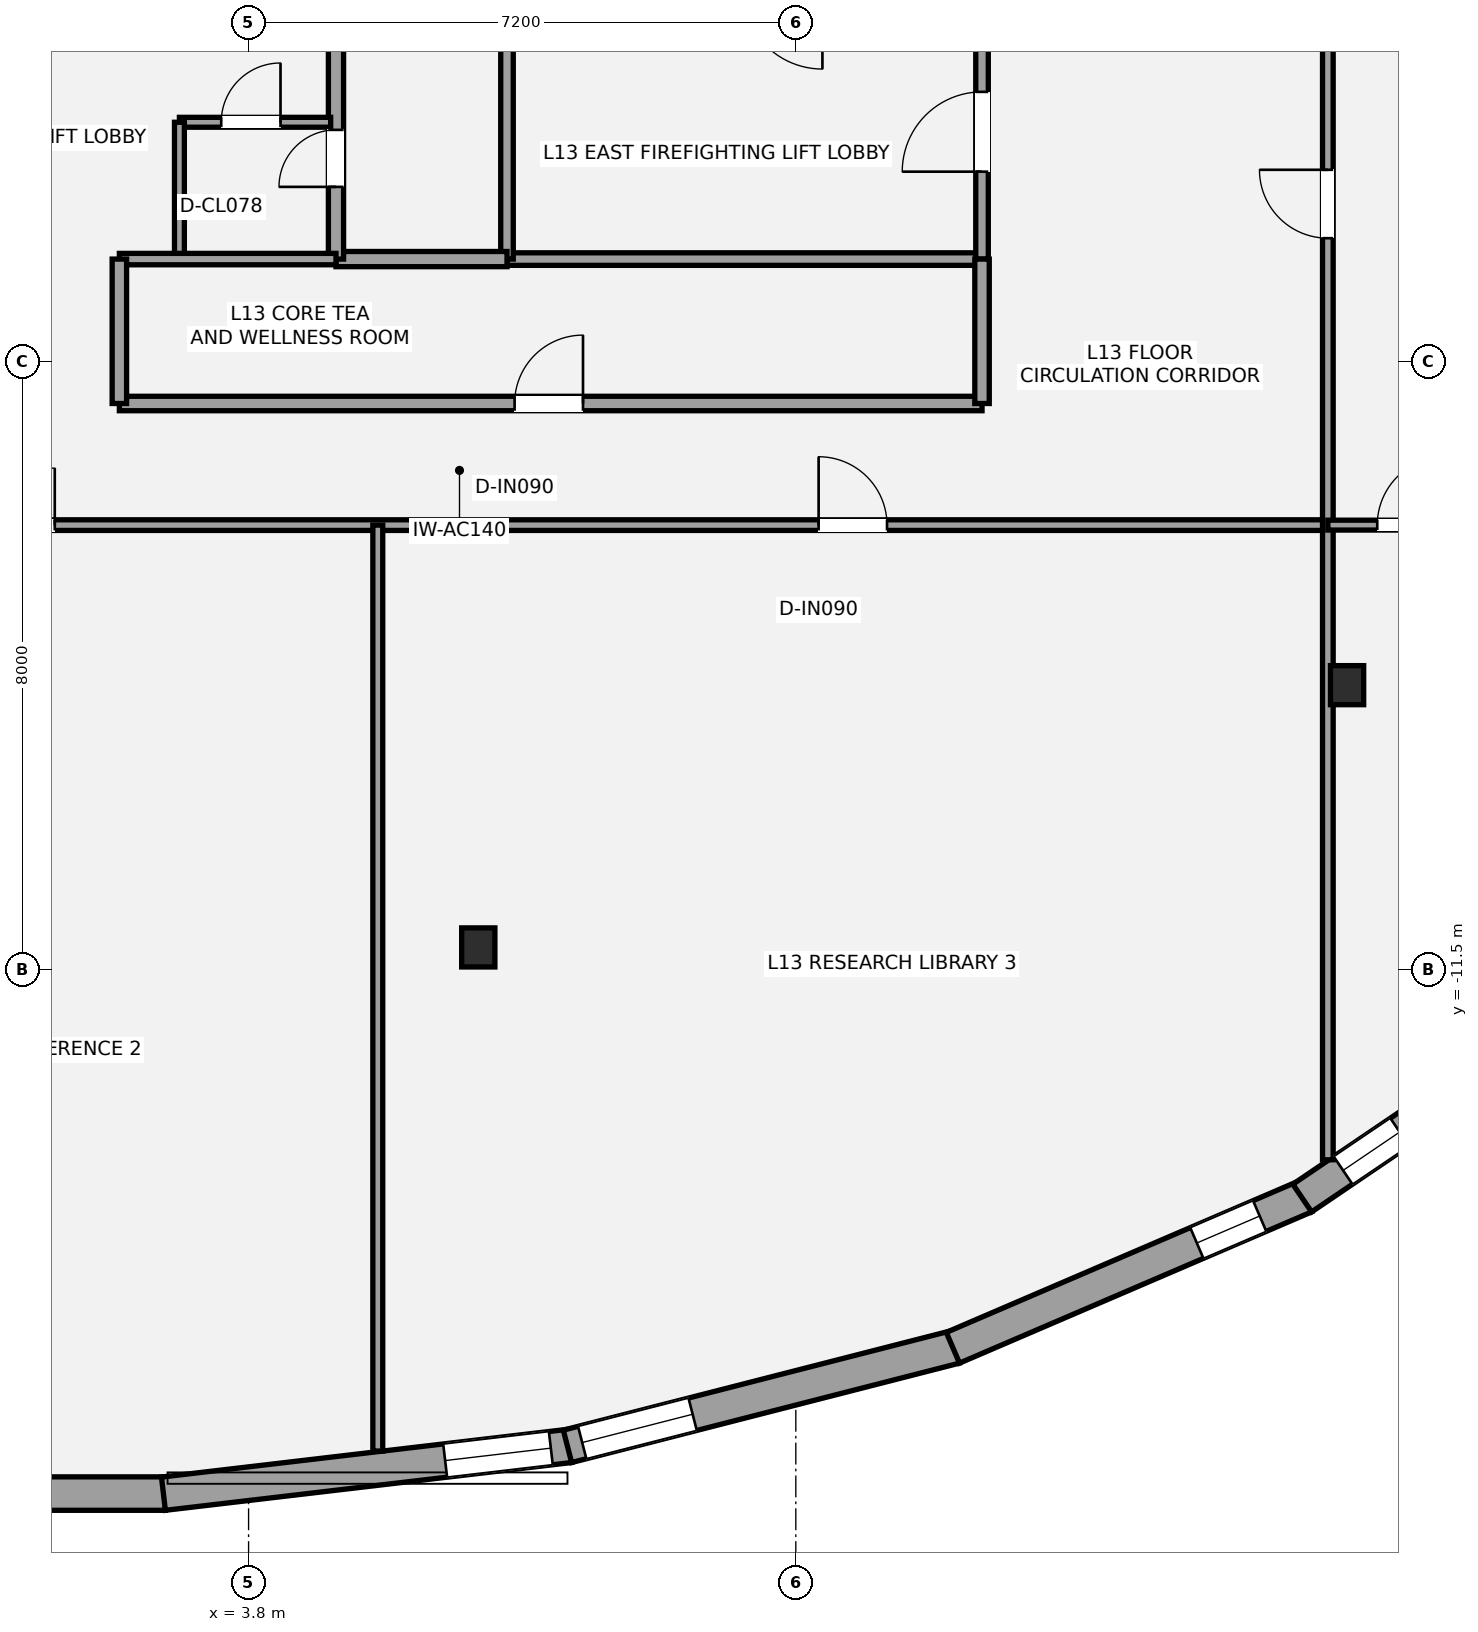
"""IFC4 building model, lengths in metres.
Left out: names, types, materials, properties, quantities, classifications, styles, units other than length and angle.
Written with IfcOpenShell. Run it as: python <this file> out.ifc"""

import sys

from ifc_helpers import new_model, si_unit, direction, frame, frame_2d, origin, origin_2d, place, context, subcontext, project, spatial, rectangle, i_section, extrude, element, fill, save


model = new_model("IFC4")
c1 = context("Model", 3, precision=1e-05, world=origin(), true_north=direction((0.0, 1.0)))
c2 = subcontext(c1, "Body", "Model", "MODEL_VIEW")
j1 = project(units=[si_unit("LENGTHUNIT", "METRE"), si_unit("PLANEANGLEUNIT", "RADIAN")], contexts=[c1])
p1 = place(None, origin())
s1 = spatial("IfcSite", under=j1, at=p1, CompositionType="ELEMENT")
p2 = place(p1, origin())
s2 = spatial("IfcBuilding", under=s1, at=p2, CompositionType="ELEMENT")
p3 = place(p2, frame((0.0, 0.0, 52.2)))
s3 = spatial("IfcBuildingStorey", under=s2, at=p3, CompositionType="ELEMENT", Elevation=52.2)
for number, where, z_axis, x_axis in (
    (1, (6.822, -11.206, 0.0), (0.0, 0.0, 1.0), (1.0, 0.0, 0.0)),
    (2, (18.253, -7.756, 0.0), (0.0, 0.0, 1.0), (1.0, 0.0, 0.0)),
):
    element("IfcColumn", number, at=place(p3, frame(where, z_axis=z_axis, x_axis=x_axis)), inside=s3, PredefinedType="COLUMN", context=c2, shape_type="SweptSolid", body=[
        extrude(i_section(OverallWidth=0.437, OverallDepth=0.514, WebThickness=0.061, FlangeThickness=0.097, at=origin_2d()), origin(), (0.0, 0.0, 1.0), 3.6),
    ])
p4 = place(p3, frame((2.705, -18.391, 0.0), z_axis=(0.0, 0.0, 1.0), x_axis=(-1.0, 0.0, 0.0)))
e3 = element("IfcWall", 3, at=p4, inside=s3, PredefinedType="STANDARD", context=c2, shape_type="SweptSolid", body=[
    extrude(rectangle(XDim=5.41, YDim=0.44, at=frame_2d((2.705, 0.0))), origin(), (0.0, 0.0, 1.0), 2.533),
])
p5 = place(p4, frame((3.761, 0.0, 0.58)))
e4 = element("IfcOpeningElement", 4, at=p5, cuts=e3, PredefinedType="OPENING", context=c2, shape_type="SweptSolid", body=[
    extrude(rectangle(XDim=1.4, YDim=1.55, at=frame_2d((0.7, 0.775))), frame((0.0, 0.23, 0.0), z_axis=(0.0, -1.0, 0.0), x_axis=(1.0, 0.0, 0.0)), (0.0, 0.0, 1.0), 0.46),
])
p6 = place(p3, frame((8.025, -17.764, 0.0), z_axis=(0.0, 0.0, 1.0), x_axis=(-0.993159890371, -0.116762289112, 0.0)))
e5 = element("IfcWall", 5, at=p6, inside=s3, PredefinedType="STANDARD", context=c2, shape_type="SweptSolid", body=[
    extrude(rectangle(XDim=5.382, YDim=0.44, at=frame_2d((2.691, 0.0))), origin(), (0.0, 0.0, 1.0), 2.533),
])
p7 = place(p6, frame((0.25, 0.0, 0.45)))
e6 = element("IfcOpeningElement", 6, at=p7, cuts=e5, PredefinedType="OPENING", context=c2, shape_type="SweptSolid", body=[
    extrude(rectangle(XDim=1.4, YDim=1.55, at=frame_2d((0.7, 0.775))), frame((0.0, 0.23, 0.0), z_axis=(0.0, -1.0, 0.0), x_axis=(1.0, 0.0, 0.0)), (0.0, 0.0, 1.0), 0.46),
])
p8 = place(p3, frame((13.099, -16.462, 0.0), z_axis=(0.0, 0.0, 1.0), x_axis=(-0.968705592422, -0.248212560542, 0.0)))
e7 = element("IfcWall", 7, at=p8, inside=s3, PredefinedType="STANDARD", context=c2, shape_type="SweptSolid", body=[
    extrude(rectangle(XDim=5.268, YDim=0.44, at=frame_2d((2.634, 0.0))), origin(), (0.0, 0.0, 1.0), 2.533),
])
p9 = place(p8, frame((3.568, 0.0, 0.48)))
e8 = element("IfcOpeningElement", 8, at=p9, cuts=e7, PredefinedType="OPENING", context=c2, shape_type="SweptSolid", body=[
    extrude(rectangle(XDim=1.5, YDim=1.7, at=frame_2d((0.75, 0.85))), frame((0.0, 0.23, 0.0), z_axis=(0.0, -1.0, 0.0), x_axis=(1.0, 0.0, 0.0)), (0.0, 0.0, 1.0), 0.46),
])
p10 = place(p3, frame((17.7, -14.483, 0.0), z_axis=(0.0, 0.0, 1.0), x_axis=(-0.918881850071, -0.394532819433, 0.0)))
e9 = element("IfcWall", 9, at=p10, inside=s3, PredefinedType="STANDARD", context=c2, shape_type="SweptSolid", body=[
    extrude(rectangle(XDim=5.042, YDim=0.44, at=frame_2d((2.521, 0.0))), origin(), (0.0, 0.0, 1.0), 2.533),
])
p11 = place(p10, frame((0.649, 0.0, 0.58)))
e10 = element("IfcOpeningElement", 10, at=p11, cuts=e9, PredefinedType="OPENING", context=c2, shape_type="SweptSolid", body=[
    extrude(rectangle(XDim=0.9, YDim=1.35, at=frame_2d((0.45, 0.675))), frame((0.0, 0.23, 0.0), z_axis=(0.0, -1.0, 0.0), x_axis=(1.0, 0.0, 0.0)), (0.0, 0.0, 1.0), 0.46),
])
p12 = place(p3, frame((21.549, -11.87, 0.0), z_axis=(0.0, 0.0, 1.0), x_axis=(-0.827825981515, -0.560984976919, 0.0)))
e11 = element("IfcWall", 11, at=p12, inside=s3, PredefinedType="STANDARD", context=c2, shape_type="SweptSolid", body=[
    extrude(rectangle(XDim=4.695, YDim=0.44, at=frame_2d((2.347, 0.0))), origin(), (0.0, 0.0, 1.0), 2.533),
])
p13 = place(p12, frame((3.145, 0.0, 0.58)))
e12 = element("IfcOpeningElement", 12, at=p13, cuts=e11, PredefinedType="OPENING", context=c2, shape_type="SweptSolid", body=[
    extrude(rectangle(XDim=0.9, YDim=1.35, at=frame_2d((0.45, 0.675))), frame((0.0, 0.23, 0.0), z_axis=(0.0, -1.0, 0.0), x_axis=(1.0, 0.0, 0.0)), (0.0, 0.0, 1.0), 0.46),
])
p14 = place(p3, frame((7.2, -2.15, 0.0), z_axis=(0.0, 0.0, 1.0), x_axis=(1.0, 0.0, 0.0)))
e13 = element("IfcWall", 13, at=p14, inside=s3, PredefinedType="PARTITIONING", context=c2, shape_type="SweptSolid", body=[
    extrude(rectangle(XDim=6.25, YDim=0.165, at=frame_2d((3.125, 0.0))), origin(), (0.0, 0.0, 1.0), 3.4),
])
p15 = place(p3, frame((7.2, -2.15, 0.0), z_axis=(0.0, 0.0, 1.0), x_axis=(0.0, 1.0, 0.0)))
e14 = element("IfcWall", 14, at=p15, inside=s3, PredefinedType="PARTITIONING", context=c2, shape_type="SweptSolid", body=[
    extrude(rectangle(XDim=3.15, YDim=0.165, at=frame_2d((1.575, 0.0))), origin(), (0.0, 0.0, 1.0), 2.853),
])
p16 = place(p3, frame((13.45, -2.15, 0.0), z_axis=(0.0, 0.0, 1.0), x_axis=(0.0, 1.0, 0.0)))
e15 = element("IfcWall", 15, at=p16, inside=s3, PredefinedType="PARTITIONING", context=c2, shape_type="SweptSolid", body=[
    extrude(rectangle(XDim=3.15, YDim=0.165, at=frame_2d((1.575, 0.0))), origin(), (0.0, 0.0, 1.0), 2.853),
])
p17 = place(p16, frame((1.15, 0.0, 0.0)))
e16 = element("IfcOpeningElement", 16, at=p17, cuts=e15, PredefinedType="OPENING", context=c2, shape_type="SweptSolid", body=[
    extrude(rectangle(XDim=1.05, YDim=2.15, at=frame_2d((0.525, 1.075))), frame((0.0, 0.093, 0.0), z_axis=(0.0, -1.0, 0.0), x_axis=(1.0, 0.0, 0.0)), (0.0, 0.0, 1.0), 0.185),
])
p18 = place(p3, frame((4.95, -2.15, 0.0), z_axis=(0.0, 0.0, 1.0), x_axis=(1.0, 0.0, 0.0)))
e17 = element("IfcWall", 17, at=p18, inside=s3, PredefinedType="SOLIDWALL", context=c2, shape_type="SweptSolid", body=[
    extrude(rectangle(XDim=2.25, YDim=0.2, at=frame_2d((1.125, 0.0))), origin(), (0.0, 0.0, 1.0), 3.4),
])
p19 = place(p3, frame((4.95, -2.15, 0.0), z_axis=(0.0, 0.0, 1.0), x_axis=(0.0, 1.0, 0.0)))
e18 = element("IfcWall", 18, at=p19, inside=s3, PredefinedType="SOLIDWALL", context=c2, shape_type="SweptSolid", body=[
    extrude(rectangle(XDim=3.15, YDim=0.2, at=frame_2d((1.575, 0.0))), origin(), (0.0, 0.0, 1.0), 2.853),
])
p20 = place(p19, frame((0.95, 0.0, 0.0)))
e19 = element("IfcOpeningElement", 19, at=p20, cuts=e18, PredefinedType="OPENING", context=c2, shape_type="SweptSolid", body=[
    extrude(rectangle(XDim=0.75, YDim=2.1, at=frame_2d((0.375, 1.05))), frame((0.0, 0.11, 0.0), z_axis=(0.0, -1.0, 0.0), x_axis=(1.0, 0.0, 0.0)), (0.0, 0.0, 1.0), 0.22),
])
p21 = place(p3, frame((2.89, -0.35, 0.0), z_axis=(0.0, 0.0, 1.0), x_axis=(1.0, 0.0, 0.0)))
e20 = element("IfcWall", 20, at=p21, inside=s3, PredefinedType="PARTITIONING", context=c2, shape_type="SweptSolid", body=[
    extrude(rectangle(XDim=1.99, YDim=0.13, at=frame_2d((0.995, 0.0))), origin(), (0.0, 0.0, 1.0), 3.4),
])
p22 = place(p21, frame((0.55, 0.0, 0.0)))
e21 = element("IfcOpeningElement", 21, at=p22, cuts=e20, PredefinedType="OPENING", context=c2, shape_type="SweptSolid", body=[
    extrude(rectangle(XDim=0.78, YDim=2.1, at=frame_2d((0.39, 1.05))), frame((0.0, 0.075, 0.0), z_axis=(0.0, -1.0, 0.0), x_axis=(1.0, 0.0, 0.0)), (0.0, 0.0, 1.0), 0.15),
])
p23 = place(p3, frame((2.89, -2.15, 0.0), z_axis=(0.0, 0.0, 1.0), x_axis=(0.0, 1.0, 0.0)))
e22 = element("IfcWall", 22, at=p23, inside=s3, PredefinedType="PARTITIONING", context=c2, shape_type="SweptSolid", body=[
    extrude(rectangle(XDim=1.8, YDim=0.13, at=frame_2d((0.9, 0.0))), origin(), (0.0, 0.0, 1.0), 3.4),
])
p24 = place(p3, frame((2.1, -4.05, 0.0), z_axis=(0.0, 0.0, 1.0), x_axis=(1.0, 0.0, 0.0)))
e23 = element("IfcWall", 23, at=p24, inside=s3, PredefinedType="PLUMBINGWALL", context=c2, shape_type="SweptSolid", body=[
    extrude(rectangle(XDim=11.35, YDim=0.19, at=frame_2d((5.675, 0.0))), origin(), (0.0, 0.0, 1.0), 2.933),
])
p25 = place(p24, frame((5.2, 0.0, 0.0)))
e24 = element("IfcOpeningElement", 24, at=p25, cuts=e23, PredefinedType="OPENING", context=c2, shape_type="SweptSolid", body=[
    extrude(rectangle(XDim=0.9, YDim=2.1, at=frame_2d((0.45, 1.05))), frame((0.0, 0.105, 0.0), z_axis=(0.0, -1.0, 0.0), x_axis=(1.0, 0.0, 0.0)), (0.0, 0.0, 1.0), 0.21),
])
p26 = place(p3, frame((2.1, -2.15, 0.0), z_axis=(0.0, 0.0, 1.0), x_axis=(1.0, 0.0, 0.0)))
e25 = element("IfcWall", 25, at=p26, inside=s3, PredefinedType="PLUMBINGWALL", context=c2, shape_type="SweptSolid", body=[
    extrude(rectangle(XDim=2.85, YDim=0.15, at=frame_2d((1.425, 0.0))), origin(), (0.0, 0.0, 1.0), 3.4),
])
p27 = place(p3, frame((2.1, -4.05, 0.0), z_axis=(0.0, 0.0, 1.0), x_axis=(0.0, 1.0, 0.0)))
e26 = element("IfcWall", 26, at=p27, inside=s3, PredefinedType="PLUMBINGWALL", context=c2, shape_type="SweptSolid", body=[
    extrude(rectangle(XDim=1.9, YDim=0.19, at=frame_2d((0.95, 0.0))), origin(), (0.0, 0.0, 1.0), 3.4),
])
p28 = place(p3, frame((13.45, -4.05, 0.0), z_axis=(0.0, 0.0, 1.0), x_axis=(0.0, 1.0, 0.0)))
e27 = element("IfcWall", 27, at=p28, inside=s3, PredefinedType="PLUMBINGWALL", context=c2, shape_type="SweptSolid", body=[
    extrude(rectangle(XDim=1.9, YDim=0.19, at=frame_2d((0.95, 0.0))), origin(), (0.0, 0.0, 1.0), 2.853),
])
p29 = place(p3, frame((-16.1, -5.65, 0.0), z_axis=(0.0, 0.0, 1.0), x_axis=(1.0, 0.0, 0.0)))
e28 = element("IfcWall", 28, at=p29, inside=s3, PredefinedType="PARTITIONING", context=c2, shape_type="SweptSolid", body=[
    extrude(rectangle(XDim=34.1, YDim=0.14, at=frame_2d((17.05, 0.0))), origin(), (0.0, 0.0, 1.0), 3.4),
])
p30 = place(p29, frame((5.35, 0.0, 0.0)))
e29 = element("IfcOpeningElement", 29, at=p30, cuts=e28, PredefinedType="OPENING", context=c2, shape_type="SweptSolid", body=[
    extrude(rectangle(XDim=0.9, YDim=2.1, at=frame_2d((0.45, 1.05))), frame((0.0, 0.08, 0.0), z_axis=(0.0, -1.0, 0.0), x_axis=(1.0, 0.0, 0.0)), (0.0, 0.0, 1.0), 0.16),
])
p31 = place(p29, frame((15.85, 0.0, 0.0)))
e30 = element("IfcOpeningElement", 30, at=p31, cuts=e28, PredefinedType="OPENING", context=c2, shape_type="SweptSolid", body=[
    extrude(rectangle(XDim=1.5, YDim=2.15, at=frame_2d((0.75, 1.075))), frame((0.0, 0.08, 0.0), z_axis=(0.0, -1.0, 0.0), x_axis=(1.0, 0.0, 0.0)), (0.0, 0.0, 1.0), 0.16),
])
p32 = place(p29, frame((27.4, 0.0, 0.0)))
e31 = element("IfcOpeningElement", 31, at=p32, cuts=e28, PredefinedType="OPENING", context=c2, shape_type="SweptSolid", body=[
    extrude(rectangle(XDim=0.9, YDim=2.1, at=frame_2d((0.45, 1.05))), frame((0.0, 0.08, 0.0), z_axis=(0.0, -1.0, 0.0), x_axis=(1.0, 0.0, 0.0)), (0.0, 0.0, 1.0), 0.16),
])
p33 = place(p3, frame((18.0, -14.0, 0.0), z_axis=(0.0, 0.0, 1.0), x_axis=(0.0, 1.0, 0.0)))
e32 = element("IfcWall", 32, at=p33, inside=s3, PredefinedType="PARTITIONING", context=c2, shape_type="SweptSolid", body=[
    extrude(rectangle(XDim=19.85, YDim=0.14, at=frame_2d((9.925, 0.0))), origin(), (0.0, 0.0, 1.0), 2.841),
])
p34 = place(p33, frame((12.125, 0.0, 0.0)))
e33 = element("IfcOpeningElement", 33, at=p34, cuts=e32, PredefinedType="OPENING", context=c2, shape_type="SweptSolid", body=[
    extrude(rectangle(XDim=0.9, YDim=2.1, at=frame_2d((0.45, 1.05))), frame((0.0, 0.08, 0.0), z_axis=(0.0, -1.0, 0.0), x_axis=(1.0, 0.0, 0.0)), (0.0, 0.0, 1.0), 0.16),
])
p35 = place(p33, frame((17.875, 0.0, 0.0)))
e34 = element("IfcOpeningElement", 34, at=p35, cuts=e32, PredefinedType="OPENING", context=c2, shape_type="SweptSolid", body=[
    extrude(rectangle(XDim=0.9, YDim=2.1, at=frame_2d((0.45, 1.05))), frame((0.0, 0.08, 0.0), z_axis=(0.0, -1.0, 0.0), x_axis=(1.0, 0.0, 0.0)), (0.0, 0.0, 1.0), 0.16),
])
p36 = place(p3, frame((5.5, -17.832, 0.0), z_axis=(0.0, 0.0, 1.0), x_axis=(0.0, 1.0, 0.0)))
e35 = element("IfcWall", 35, at=p36, inside=s3, PredefinedType="PARTITIONING", context=c2, shape_type="SweptSolid", body=[
    extrude(rectangle(XDim=12.182, YDim=0.13, at=frame_2d((6.091, 0.0))), origin(), (0.0, 0.0, 1.0), 2.853),
])
p37 = place(p3, frame((18.0, -5.65, 0.0), z_axis=(0.0, 0.0, 1.0), x_axis=(1.0, 0.0, 0.0)))
e36 = element("IfcWall", 36, at=p37, inside=s3, PredefinedType="PARTITIONING", context=c2, shape_type="SweptSolid", body=[
    extrude(rectangle(XDim=7.917, YDim=0.13, at=frame_2d((3.958, 0.0))), origin(), (0.0, 0.0, 1.0), 2.779),
])
p38 = place(p37, frame((0.65, 0.0, 0.0)))
e37 = element("IfcOpeningElement", 37, at=p38, cuts=e36, PredefinedType="OPENING", context=c2, shape_type="SweptSolid", body=[
    extrude(rectangle(XDim=0.9, YDim=2.1, at=frame_2d((0.45, 1.05))), frame((0.0, 0.075, 0.0), z_axis=(0.0, -1.0, 0.0), x_axis=(1.0, 0.0, 0.0)), (0.0, 0.0, 1.0), 0.15),
])
p39 = place(p7, origin())
e38 = element("IfcWindow", 38, at=p39, inside=s3, PartitioningType="SINGLE_PANEL", PredefinedType="WINDOW", context=c2, shape_type="SweptSolid", body=[
    extrude(rectangle(XDim=1.4, YDim=1.55, at=frame_2d((0.7, 0.775))), frame((0.0, -0.01, 0.0), z_axis=(0.0, -1.0, 0.0), x_axis=(1.0, 0.0, 0.0)), (0.0, 0.0, 1.0), 0.06),
])
fill(e6, e38)
p40 = place(p9, origin())
e39 = element("IfcWindow", 39, at=p40, inside=s3, PartitioningType="SINGLE_PANEL", PredefinedType="WINDOW", context=c2, shape_type="SweptSolid", body=[
    extrude(rectangle(XDim=1.5, YDim=1.7, at=frame_2d((0.75, 0.85))), frame((0.0, -0.01, 0.0), z_axis=(0.0, -1.0, 0.0), x_axis=(1.0, 0.0, 0.0)), (0.0, 0.0, 1.0), 0.06),
])
fill(e8, e39)
p41 = place(p11, origin())
e40 = element("IfcWindow", 40, at=p41, inside=s3, PartitioningType="SINGLE_PANEL", PredefinedType="WINDOW", context=c2, shape_type="SweptSolid", body=[
    extrude(rectangle(XDim=0.9, YDim=1.35, at=frame_2d((0.45, 0.675))), frame((0.0, -0.01, 0.0), z_axis=(0.0, -1.0, 0.0), x_axis=(1.0, 0.0, 0.0)), (0.0, 0.0, 1.0), 0.06),
])
fill(e10, e40)
p42 = place(p13, origin())
e41 = element("IfcWindow", 41, at=p42, inside=s3, PartitioningType="SINGLE_PANEL", PredefinedType="WINDOW", context=c2, shape_type="SweptSolid", body=[
    extrude(rectangle(XDim=0.9, YDim=1.35, at=frame_2d((0.45, 0.675))), frame((0.0, -0.01, 0.0), z_axis=(0.0, -1.0, 0.0), x_axis=(1.0, 0.0, 0.0)), (0.0, 0.0, 1.0), 0.06),
])
fill(e12, e41)
p43 = place(p17, origin())
e42 = element("IfcDoor", 42, at=p43, inside=s3, OperationType="SINGLE_SWING_LEFT", PredefinedType="DOOR", context=c2, shape_type="SweptSolid", body=[
    extrude(rectangle(XDim=1.05, YDim=2.15, at=frame_2d((0.525, 1.075))), frame((0.0, 0.025, 0.0), z_axis=(0.0, -1.0, 0.0), x_axis=(1.0, 0.0, 0.0)), (0.0, 0.0, 1.0), 0.05),
])
fill(e16, e42)
p44 = place(p20, origin())
e43 = element("IfcDoor", 43, at=p44, inside=s3, OperationType="SINGLE_SWING_LEFT", PredefinedType="DOOR", context=c2, shape_type="SweptSolid", body=[
    extrude(rectangle(XDim=0.75, YDim=2.1, at=frame_2d((0.375, 1.05))), frame((0.0, 0.025, 0.0), z_axis=(0.0, -1.0, 0.0), x_axis=(1.0, 0.0, 0.0)), (0.0, 0.0, 1.0), 0.05),
])
fill(e19, e43)
p45 = place(p22, origin())
e44 = element("IfcDoor", 44, at=p45, inside=s3, OperationType="SINGLE_SWING_RIGHT", PredefinedType="DOOR", context=c2, shape_type="SweptSolid", body=[
    extrude(rectangle(XDim=0.78, YDim=2.1, at=frame_2d((0.39, 1.05))), frame((0.0, 0.025, 0.0), z_axis=(0.0, -1.0, 0.0), x_axis=(1.0, 0.0, 0.0)), (0.0, 0.0, 1.0), 0.05),
])
fill(e21, e44)
p46 = place(p25, origin())
e45 = element("IfcDoor", 45, at=p46, inside=s3, OperationType="SINGLE_SWING_RIGHT", PredefinedType="DOOR", context=c2, shape_type="SweptSolid", body=[
    extrude(rectangle(XDim=0.9, YDim=2.1, at=frame_2d((0.45, 1.05))), frame((0.0, 0.025, 0.0), z_axis=(0.0, -1.0, 0.0), x_axis=(1.0, 0.0, 0.0)), (0.0, 0.0, 1.0), 0.05),
])
fill(e24, e45)
p47 = place(p31, origin())
e46 = element("IfcDoor", 46, at=p47, inside=s3, OperationType="DOUBLE_DOOR_SINGLE_SWING", PredefinedType="DOOR", context=c2, shape_type="SweptSolid", body=[
    extrude(rectangle(XDim=1.5, YDim=2.15, at=frame_2d((0.75, 1.075))), frame((0.0, 0.025, 0.0), z_axis=(0.0, -1.0, 0.0), x_axis=(1.0, 0.0, 0.0)), (0.0, 0.0, 1.0), 0.05),
])
fill(e30, e46)
p48 = place(p32, origin())
e47 = element("IfcDoor", 47, at=p48, inside=s3, OperationType="SINGLE_SWING_LEFT", PredefinedType="DOOR", context=c2, shape_type="SweptSolid", body=[
    extrude(rectangle(XDim=0.9, YDim=2.1, at=frame_2d((0.45, 1.05))), frame((0.0, 0.025, 0.0), z_axis=(0.0, -1.0, 0.0), x_axis=(1.0, 0.0, 0.0)), (0.0, 0.0, 1.0), 0.05),
])
fill(e31, e47)
p49 = place(p38, origin())
e48 = element("IfcDoor", 48, at=p49, inside=s3, OperationType="SINGLE_SWING_RIGHT", PredefinedType="DOOR", context=c2, shape_type="SweptSolid", body=[
    extrude(rectangle(XDim=0.9, YDim=2.1, at=frame_2d((0.45, 1.05))), frame((0.0, 0.025, 0.0), z_axis=(0.0, -1.0, 0.0), x_axis=(1.0, 0.0, 0.0)), (0.0, 0.0, 1.0), 0.05),
])
fill(e37, e48)
p50 = place(p34, origin())
e49 = element("IfcDoor", 49, at=p50, inside=s3, OperationType="SINGLE_SWING_RIGHT", PredefinedType="DOOR", context=c2, shape_type="SweptSolid", body=[
    extrude(rectangle(XDim=0.9, YDim=2.1, at=frame_2d((0.45, 1.05))), frame((0.0, 0.025, 0.0), z_axis=(0.0, -1.0, 0.0), x_axis=(1.0, 0.0, 0.0)), (0.0, 0.0, 1.0), 0.05),
])
fill(e33, e49)
save(model, sys.argv[1])
